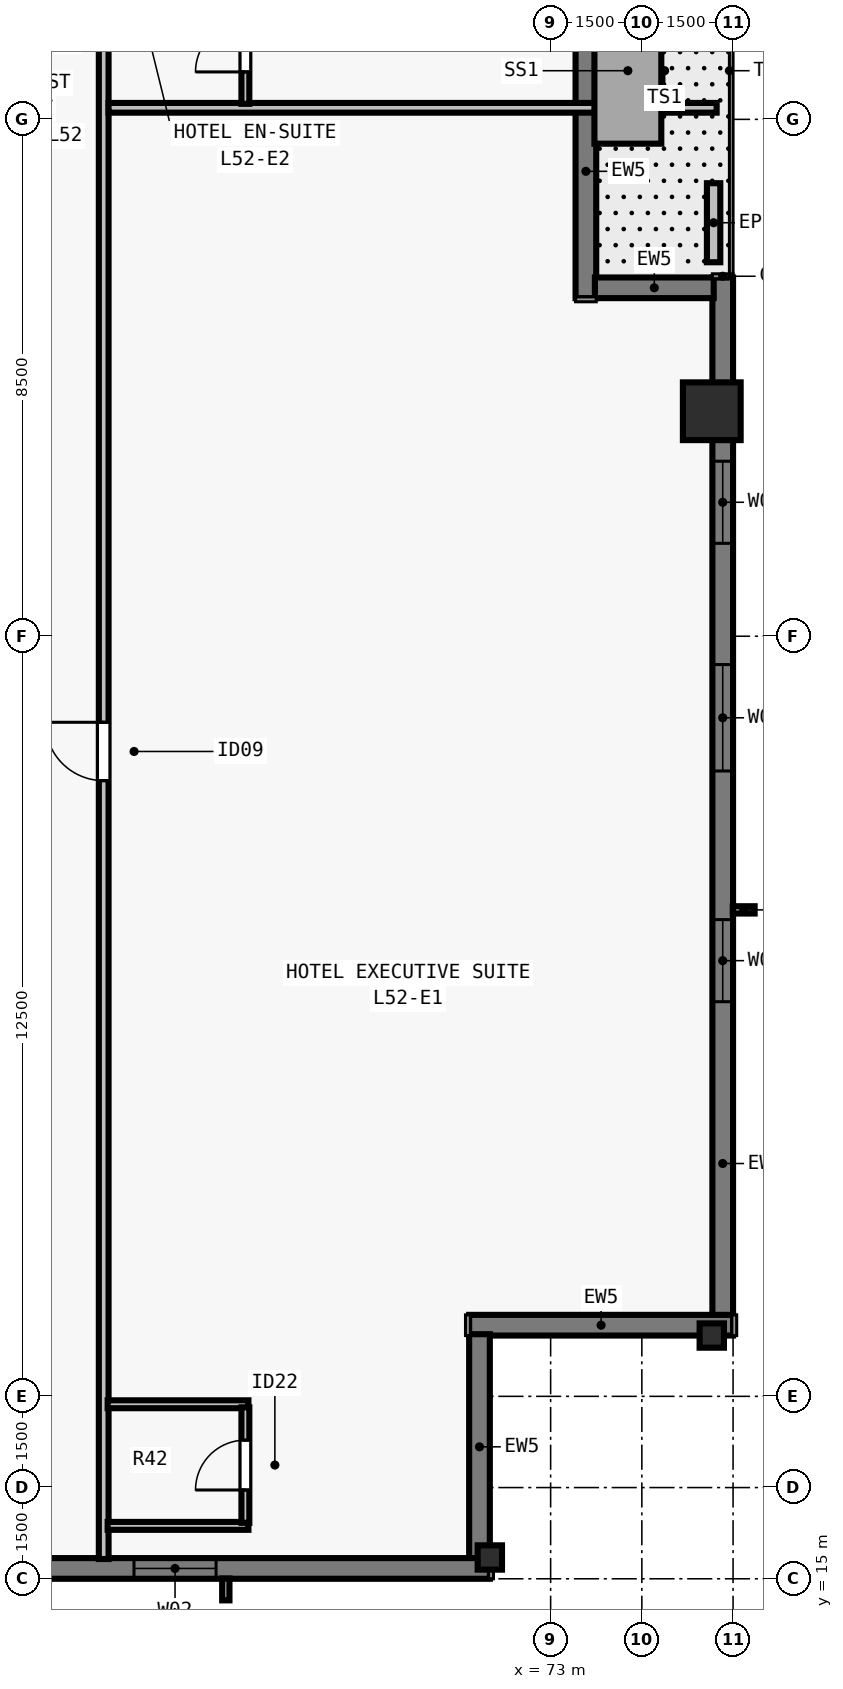
"""IFC4 building model, lengths in metres.
Left out: names, types, materials, properties, quantities, classifications, styles, units other than length and angle.
Written with IfcOpenShell. Run it as: python <this file> out.ifc"""

import sys

from ifc_helpers import new_model, si_unit, direction, frame, frame_2d, origin, origin_2d, place, context, subcontext, project, spatial, rectangle, i_section, extrude, element, fill, save


model = new_model("IFC4")
c1 = context("Model", 3, precision=1e-05, world=origin(), true_north=direction((0.0, 1.0)))
c2 = subcontext(c1, "Body", "Model", "MODEL_VIEW")
j1 = project(units=[si_unit("LENGTHUNIT", "METRE"), si_unit("PLANEANGLEUNIT", "RADIAN")], contexts=[c1])
p1 = place(None, origin())
s1 = spatial("IfcSite", under=j1, at=p1, CompositionType="ELEMENT")
p2 = place(p1, origin())
s2 = spatial("IfcBuilding", under=s1, at=p2, CompositionType="ELEMENT")
p3 = place(p2, frame((0.0, 0.0, 190.0)))
s3 = spatial("IfcBuildingStorey", under=s2, at=p3, CompositionType="ELEMENT", Elevation=190.0)
for number, where, z_axis, x_axis in (
    (1, (72.0, 15.35, 0.0), (0.0, 0.0, 1.0), (1.0, 0.0, 0.0)),
    (2, (75.65, 19.0, 0.0), (0.0, 0.0, 1.0), (0.0, 1.0, 0.0)),
):
    element("IfcColumn", number, at=place(p3, frame(where, z_axis=z_axis, x_axis=x_axis)), inside=s3, PredefinedType="COLUMN", context=c2, shape_type="SweptSolid", body=[
        extrude(i_section(OverallWidth=0.4, OverallDepth=0.4, WebThickness=0.022, FlangeThickness=0.036, at=origin_2d()), origin(), (0.0, 0.0, 1.0), 3.5),
    ])
p4 = place(p3, frame((75.65, 34.2, 0.0), z_axis=(0.0, 0.0, 1.0), x_axis=(0.0, 1.0, 0.0)))
e3 = element("IfcColumn", 3, at=p4, inside=s3, PredefinedType="COLUMN", context=c2, shape_type="SweptSolid", body=[
    extrude(rectangle(XDim=0.95, YDim=0.95, at=origin_2d()), origin(), (0.0, 0.0, 1.0), 3.5),
])
p5 = place(p3, frame((75.83, 36.4, 0.0), z_axis=(0.0, 0.0, 1.0), x_axis=(0.0, -1.0, 0.0)))
e4 = element("IfcWall", 4, at=p5, inside=s3, PredefinedType="SOLIDWALL", context=c2, shape_type="SweptSolid", body=[
    extrude(rectangle(XDim=17.082, YDim=0.34, at=frame_2d((8.541, 0.0))), origin(), (0.0, 0.0, 1.0), 3.24),
])
p6 = place(p5, frame((3.022, 0.0, 0.8)))
e5 = element("IfcOpeningElement", 5, at=p6, cuts=e4, PredefinedType="OPENING", context=c2, shape_type="SweptSolid", body=[
    extrude(rectangle(XDim=1.35, YDim=1.62, at=frame_2d((0.675, 0.81))), frame((0.0, 0.18, 0.0), z_axis=(0.0, -1.0, 0.0), x_axis=(1.0, 0.0, 0.0)), (0.0, 0.0, 1.0), 0.36),
])
p7 = place(p5, frame((6.366, 0.0, 0.8)))
e6 = element("IfcOpeningElement", 6, at=p7, cuts=e4, PredefinedType="OPENING", context=c2, shape_type="SweptSolid", body=[
    extrude(rectangle(XDim=1.75, YDim=1.62, at=frame_2d((0.875, 0.81))), frame((0.0, 0.18, 0.0), z_axis=(0.0, -1.0, 0.0), x_axis=(1.0, 0.0, 0.0)), (0.0, 0.0, 1.0), 0.36),
])
p8 = place(p5, frame((10.56, 0.0, 0.8)))
e7 = element("IfcOpeningElement", 7, at=p8, cuts=e4, PredefinedType="OPENING", context=c2, shape_type="SweptSolid", body=[
    extrude(rectangle(XDim=1.35, YDim=1.62, at=frame_2d((0.675, 0.81))), frame((0.0, 0.18, 0.0), z_axis=(0.0, -1.0, 0.0), x_axis=(1.0, 0.0, 0.0)), (0.0, 0.0, 1.0), 0.36),
])
p9 = place(p3, frame((76.0, 19.17, 0.0), z_axis=(0.0, 0.0, 1.0), x_axis=(-1.0, 0.0, 0.0)))
e8 = element("IfcWall", 8, at=p9, inside=s3, PredefinedType="SOLIDWALL", context=c2, shape_type="SweptSolid", body=[
    extrude(rectangle(XDim=4.34, YDim=0.34, at=frame_2d((2.17, 0.0))), origin(), (0.0, 0.0, 1.0), 3.24),
])
p10 = place(p3, frame((71.83, 19.022, 0.0), z_axis=(0.0, 0.0, 1.0), x_axis=(0.0, -1.0, 0.0)))
e9 = element("IfcWall", 9, at=p10, inside=s3, PredefinedType="SOLIDWALL", context=c2, shape_type="SweptSolid", body=[
    extrude(rectangle(XDim=3.704, YDim=0.34, at=frame_2d((1.852, 0.0))), origin(), (0.0, 0.0, 1.0), 3.24),
])
p11 = place(p3, frame((72.0, 15.17, 0.0), z_axis=(0.0, 0.0, 1.0), x_axis=(-1.0, 0.0, 0.0)))
e10 = element("IfcWall", 10, at=p11, inside=s3, PredefinedType="SOLIDWALL", context=c2, shape_type="SweptSolid", body=[
    extrude(rectangle(XDim=39.682, YDim=0.34, at=frame_2d((19.841, 0.0))), origin(), (0.0, 0.0, 1.0), 3.24),
])
p12 = place(p11, frame((4.502, 0.0, 0.8)))
e11 = element("IfcOpeningElement", 11, at=p12, cuts=e10, PredefinedType="OPENING", context=c2, shape_type="SweptSolid", body=[
    extrude(rectangle(XDim=1.35, YDim=1.62, at=frame_2d((0.675, 0.81))), frame((0.0, 0.18, 0.0), z_axis=(0.0, -1.0, 0.0), x_axis=(1.0, 0.0, 0.0)), (0.0, 0.0, 1.0), 0.36),
])
p13 = place(p11, frame((8.755, 0.0, 0.8)))
e12 = element("IfcOpeningElement", 12, at=p13, cuts=e10, PredefinedType="OPENING", context=c2, shape_type="SweptSolid", body=[
    extrude(rectangle(XDim=1.75, YDim=1.62, at=frame_2d((0.875, 0.81))), frame((0.0, 0.18, 0.0), z_axis=(0.0, -1.0, 0.0), x_axis=(1.0, 0.0, 0.0)), (0.0, 0.0, 1.0), 0.36),
])
p14 = place(p11, frame((12.059, 0.0, 0.8)))
e13 = element("IfcOpeningElement", 13, at=p14, cuts=e10, PredefinedType="OPENING", context=c2, shape_type="SweptSolid", body=[
    extrude(rectangle(XDim=1.35, YDim=1.62, at=frame_2d((0.675, 0.81))), frame((0.0, 0.18, 0.0), z_axis=(0.0, -1.0, 0.0), x_axis=(1.0, 0.0, 0.0)), (0.0, 0.0, 1.0), 0.36),
])
p15 = place(p11, frame((16.262, 0.0, 0.8)))
e14 = element("IfcOpeningElement", 14, at=p15, cuts=e10, PredefinedType="OPENING", context=c2, shape_type="SweptSolid", body=[
    extrude(rectangle(XDim=1.75, YDim=1.62, at=frame_2d((0.875, 0.81))), frame((0.0, 0.18, 0.0), z_axis=(0.0, -1.0, 0.0), x_axis=(1.0, 0.0, 0.0)), (0.0, 0.0, 1.0), 0.36),
])
p16 = place(p11, frame((20.016, 0.0, 0.8)))
e15 = element("IfcOpeningElement", 15, at=p16, cuts=e10, PredefinedType="OPENING", context=c2, shape_type="SweptSolid", body=[
    extrude(rectangle(XDim=1.35, YDim=1.62, at=frame_2d((0.675, 0.81))), frame((0.0, 0.18, 0.0), z_axis=(0.0, -1.0, 0.0), x_axis=(1.0, 0.0, 0.0)), (0.0, 0.0, 1.0), 0.36),
])
p17 = place(p11, frame((22.07, 0.0, 0.8)))
e16 = element("IfcOpeningElement", 16, at=p17, cuts=e10, PredefinedType="OPENING", context=c2, shape_type="SweptSolid", body=[
    extrude(rectangle(XDim=1.75, YDim=1.62, at=frame_2d((0.875, 0.81))), frame((0.0, 0.18, 0.0), z_axis=(0.0, -1.0, 0.0), x_axis=(1.0, 0.0, 0.0)), (0.0, 0.0, 1.0), 0.36),
])
p18 = place(p11, frame((26.273, 0.0, 0.8)))
e17 = element("IfcOpeningElement", 17, at=p18, cuts=e10, PredefinedType="OPENING", context=c2, shape_type="SweptSolid", body=[
    extrude(rectangle(XDim=1.35, YDim=1.62, at=frame_2d((0.675, 0.81))), frame((0.0, 0.18, 0.0), z_axis=(0.0, -1.0, 0.0), x_axis=(1.0, 0.0, 0.0)), (0.0, 0.0, 1.0), 0.36),
])
p19 = place(p11, frame((28.377, 0.0, 0.8)))
e18 = element("IfcOpeningElement", 18, at=p19, cuts=e10, PredefinedType="OPENING", context=c2, shape_type="SweptSolid", body=[
    extrude(rectangle(XDim=1.75, YDim=1.62, at=frame_2d((0.875, 0.81))), frame((0.0, 0.18, 0.0), z_axis=(0.0, -1.0, 0.0), x_axis=(1.0, 0.0, 0.0)), (0.0, 0.0, 1.0), 0.36),
])
p20 = place(p11, frame((33.38, 0.0, 0.8)))
e19 = element("IfcOpeningElement", 19, at=p20, cuts=e10, PredefinedType="OPENING", context=c2, shape_type="SweptSolid", body=[
    extrude(rectangle(XDim=1.35, YDim=1.62, at=frame_2d((0.675, 0.81))), frame((0.0, 0.18, 0.0), z_axis=(0.0, -1.0, 0.0), x_axis=(1.0, 0.0, 0.0)), (0.0, 0.0, 1.0), 0.36),
])
p21 = place(p3, frame((73.58, 43.222, 0.0), z_axis=(0.0, 0.0, 1.0), x_axis=(0.0, -1.0, 0.0)))
e20 = element("IfcWall", 20, at=p21, inside=s3, PredefinedType="SOLIDWALL", context=c2, shape_type="SweptSolid", body=[
    extrude(rectangle(XDim=7.162, YDim=0.34, at=frame_2d((3.581, 0.0))), origin(), (0.0, 0.0, 1.0), 3.24),
])
p22 = place(p21, frame((1.841, 0.0, 0.0)))
e21 = element("IfcOpeningElement", 21, at=p22, cuts=e20, PredefinedType="OPENING", context=c2, shape_type="SweptSolid", body=[
    extrude(rectangle(XDim=1.0, YDim=2.15, at=frame_2d((0.5, 1.075))), frame((0.0, 0.18, 0.0), z_axis=(0.0, -1.0, 0.0), x_axis=(1.0, 0.0, 0.0)), (0.0, 0.0, 1.0), 0.36),
])
p23 = place(p3, frame((73.728, 36.23, 0.0), z_axis=(0.0, 0.0, 1.0), x_axis=(1.0, 0.0, 0.0)))
e22 = element("IfcWall", 22, at=p23, inside=s3, PredefinedType="SOLIDWALL", context=c2, shape_type="SweptSolid", body=[
    extrude(rectangle(XDim=1.954, YDim=0.34, at=frame_2d((0.977, 0.0))), origin(), (0.0, 0.0, 1.0), 3.24),
])
p24 = place(p3, frame((75.68, 36.65, 0.0), z_axis=(0.0, 0.0, 1.0), x_axis=(0.0, 1.0, 0.0)))
e23 = element("IfcWall", 23, at=p24, inside=s3, PredefinedType="PARAPET", context=c2, shape_type="SweptSolid", body=[
    extrude(rectangle(XDim=1.3, YDim=0.22, at=frame_2d((0.65, 0.0))), origin(), (0.0, 0.0, 1.0), 0.55),
])
p25 = place(p3, frame((65.65, 15.325, 0.0), z_axis=(0.0, 0.0, 1.0), x_axis=(0.0, 1.0, 0.0)))
e24 = element("IfcWall", 24, at=p25, inside=s3, PredefinedType="PARTITIONING", context=c2, shape_type="SweptSolid", body=[
    extrude(rectangle(XDim=47.35, YDim=0.16, at=frame_2d((23.675, 0.0))), origin(), (0.0, 0.0, 1.0), 2.515),
])
p26 = place(p25, frame((12.8, 0.0, 0.0)))
e25 = element("IfcOpeningElement", 25, at=p26, cuts=e24, PredefinedType="OPENING", context=c2, shape_type="SweptSolid", body=[
    extrude(rectangle(XDim=0.96, YDim=2.15, at=frame_2d((0.48, 1.075))), frame((0.0, 0.09, 0.0), z_axis=(0.0, -1.0, 0.0), x_axis=(1.0, 0.0, 0.0)), (0.0, 0.0, 1.0), 0.18),
])
p27 = place(p25, frame((36.155, 0.0, 0.0)))
e26 = element("IfcOpeningElement", 26, at=p27, cuts=e24, PredefinedType="OPENING", context=c2, shape_type="SweptSolid", body=[
    extrude(rectangle(XDim=0.96, YDim=2.15, at=frame_2d((0.48, 1.075))), frame((0.0, 0.09, 0.0), z_axis=(0.0, -1.0, 0.0), x_axis=(1.0, 0.0, 0.0)), (0.0, 0.0, 1.0), 0.18),
])
for number, where, z_axis, x_axis in (
    (27, (65.715, 15.87, 0.0), (0.0, 0.0, 1.0), (1.0, 0.0, 0.0)),
    (28, (65.715, 17.87, 0.0), (0.0, 0.0, 1.0), (1.0, 0.0, 0.0)),
):
    element("IfcWall", number, at=place(p3, frame(where, z_axis=z_axis, x_axis=x_axis)), inside=s3, PredefinedType="PLUMBINGWALL", context=c2, shape_type="SweptSolid", body=[
        extrude(rectangle(XDim=2.315, YDim=0.13, at=frame_2d((1.157, 0.0))), origin(), (0.0, 0.0, 1.0), 3.24),
    ])
p28 = place(p3, frame((67.98, 15.92, 0.0), z_axis=(0.0, 0.0, 1.0), x_axis=(0.0, 1.0, 0.0)))
e29 = element("IfcWall", 29, at=p28, inside=s3, PredefinedType="PLUMBINGWALL", context=c2, shape_type="SweptSolid", body=[
    extrude(rectangle(XDim=1.9, YDim=0.13, at=frame_2d((0.95, 0.0))), origin(), (0.0, 0.0, 1.0), 3.24),
])
p29 = place(p28, frame((0.54, 0.0, 0.0)))
e30 = element("IfcOpeningElement", 30, at=p29, cuts=e29, PredefinedType="OPENING", context=c2, shape_type="SweptSolid", body=[
    extrude(rectangle(XDim=0.82, YDim=2.1, at=frame_2d((0.41, 1.05))), frame((0.0, 0.075, 0.0), z_axis=(0.0, -1.0, 0.0), x_axis=(1.0, 0.0, 0.0)), (0.0, 0.0, 1.0), 0.15),
])
p30 = place(p3, frame((65.73, 39.19, 0.0), z_axis=(0.0, 0.0, 1.0), x_axis=(1.0, 0.0, 0.0)))
e31 = element("IfcWall", 31, at=p30, inside=s3, PredefinedType="PARTITIONING", context=c2, shape_type="SweptSolid", body=[
    extrude(rectangle(XDim=10.0, YDim=0.16, at=frame_2d((5.0, 0.0))), origin(), (0.0, 0.0, 1.0), 3.24),
])
p31 = place(p3, frame((67.98, 39.255, 0.0), z_axis=(0.0, 0.0, 1.0), x_axis=(0.0, 1.0, 0.0)))
e32 = element("IfcWall", 32, at=p31, inside=s3, PredefinedType="PLUMBINGWALL", context=c2, shape_type="SweptSolid", body=[
    extrude(rectangle(XDim=1.885, YDim=0.13, at=frame_2d((0.942, 0.0))), origin(), (0.0, 0.0, 1.0), 3.24),
])
p32 = place(p31, frame((0.525, 0.0, 0.0)))
e33 = element("IfcOpeningElement", 33, at=p32, cuts=e32, PredefinedType="OPENING", context=c2, shape_type="SweptSolid", body=[
    extrude(rectangle(XDim=0.82, YDim=2.1, at=frame_2d((0.41, 1.05))), frame((0.0, 0.075, 0.0), z_axis=(0.0, -1.0, 0.0), x_axis=(1.0, 0.0, 0.0)), (0.0, 0.0, 1.0), 0.15),
])
p33 = place(p6, origin())
e34 = element("IfcWindow", 34, at=p33, inside=s3, PartitioningType="SINGLE_PANEL", PredefinedType="WINDOW", context=c2, shape_type="SweptSolid", body=[
    extrude(rectangle(XDim=1.35, YDim=1.62, at=frame_2d((0.675, 0.81))), frame((0.0, -0.05, 0.0), z_axis=(0.0, -1.0, 0.0), x_axis=(1.0, 0.0, 0.0)), (0.0, 0.0, 1.0), 0.06),
])
fill(e5, e34)
p34 = place(p7, origin())
e35 = element("IfcWindow", 35, at=p34, inside=s3, PartitioningType="SINGLE_PANEL", PredefinedType="WINDOW", context=c2, shape_type="SweptSolid", body=[
    extrude(rectangle(XDim=1.75, YDim=1.62, at=frame_2d((0.875, 0.81))), frame((0.0, -0.05, 0.0), z_axis=(0.0, -1.0, 0.0), x_axis=(1.0, 0.0, 0.0)), (0.0, 0.0, 1.0), 0.06),
])
fill(e6, e35)
p35 = place(p8, origin())
e36 = element("IfcWindow", 36, at=p35, inside=s3, PartitioningType="SINGLE_PANEL", PredefinedType="WINDOW", context=c2, shape_type="SweptSolid", body=[
    extrude(rectangle(XDim=1.35, YDim=1.62, at=frame_2d((0.675, 0.81))), frame((0.0, -0.05, 0.0), z_axis=(0.0, -1.0, 0.0), x_axis=(1.0, 0.0, 0.0)), (0.0, 0.0, 1.0), 0.06),
])
fill(e7, e36)
p36 = place(p12, origin())
e37 = element("IfcWindow", 37, at=p36, inside=s3, PartitioningType="SINGLE_PANEL", PredefinedType="WINDOW", context=c2, shape_type="SweptSolid", body=[
    extrude(rectangle(XDim=1.35, YDim=1.62, at=frame_2d((0.675, 0.81))), frame((0.0, -0.05, 0.0), z_axis=(0.0, -1.0, 0.0), x_axis=(1.0, 0.0, 0.0)), (0.0, 0.0, 1.0), 0.06),
])
fill(e11, e37)
p37 = place(p29, origin())
e38 = element("IfcDoor", 38, at=p37, inside=s3, OperationType="SINGLE_SWING_LEFT", PredefinedType="DOOR", context=c2, shape_type="SweptSolid", body=[
    extrude(rectangle(XDim=0.82, YDim=2.1, at=frame_2d((0.41, 1.05))), frame((0.0, 0.025, 0.0), z_axis=(0.0, -1.0, 0.0), x_axis=(1.0, 0.0, 0.0)), (0.0, 0.0, 1.0), 0.05),
])
fill(e30, e38)
p38 = place(p26, origin())
e39 = element("IfcDoor", 39, at=p38, inside=s3, OperationType="SINGLE_SWING_RIGHT", PredefinedType="DOOR", context=c2, shape_type="SweptSolid", body=[
    extrude(rectangle(XDim=0.96, YDim=2.15, at=frame_2d((0.48, 1.075))), frame((0.0, 0.025, 0.0), z_axis=(0.0, -1.0, 0.0), x_axis=(1.0, 0.0, 0.0)), (0.0, 0.0, 1.0), 0.05),
])
fill(e25, e39)
p39 = place(p32, origin())
e40 = element("IfcDoor", 40, at=p39, inside=s3, OperationType="SINGLE_SWING_LEFT", PredefinedType="DOOR", context=c2, shape_type="SweptSolid", body=[
    extrude(rectangle(XDim=0.82, YDim=2.1, at=frame_2d((0.41, 1.05))), frame((0.0, 0.025, 0.0), z_axis=(0.0, -1.0, 0.0), x_axis=(1.0, 0.0, 0.0)), (0.0, 0.0, 1.0), 0.05),
])
fill(e33, e40)
save(model, sys.argv[1])
